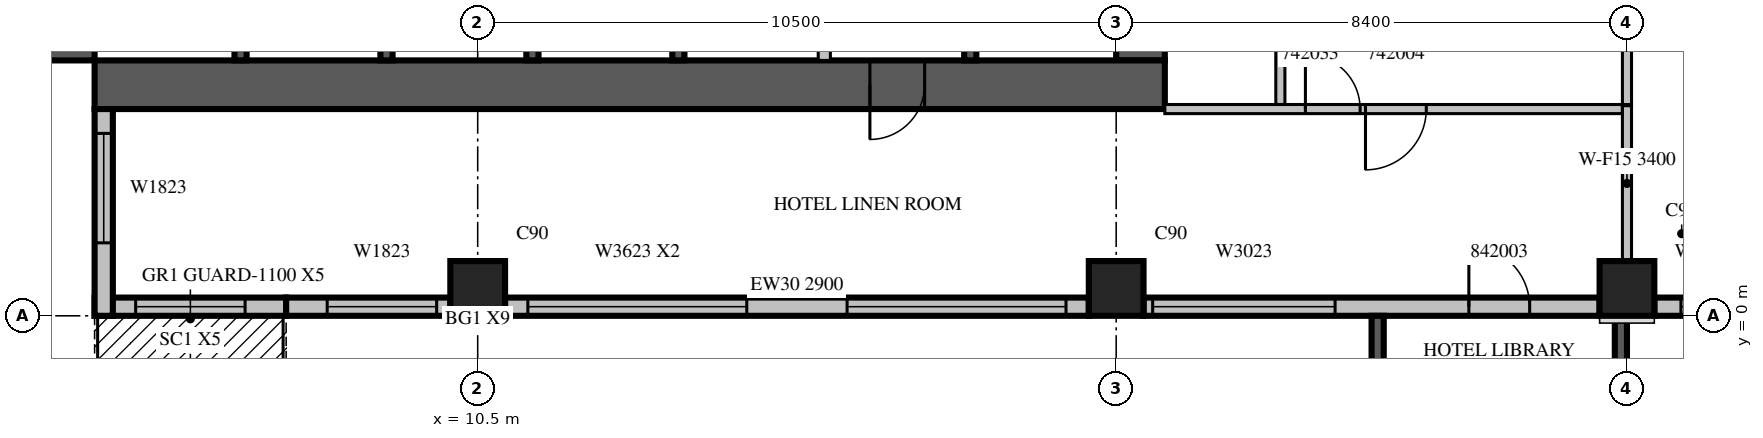
"""IFC4 building model, lengths in metres.
Left out: names, types, materials, properties, quantities, classifications, styles, units other than length and angle.
Written with IfcOpenShell. Run it as: python <this file> out.ifc"""

import sys

from ifc_helpers import new_model, si_unit, direction, frame, frame_2d, origin, origin_2d, place, context, subcontext, project, spatial, rectangle, extrude, source, transform, mapped, element, fill, save


model = new_model("IFC4")
c1 = context("Model", 3, precision=1e-05, world=origin(), true_north=direction((0.0, 1.0)))
c2 = subcontext(c1, "Body", "Model", "MODEL_VIEW")
j1 = project(units=[si_unit("LENGTHUNIT", "METRE"), si_unit("PLANEANGLEUNIT", "RADIAN")], contexts=[c1])
p1 = place(None, origin())
s1 = spatial("IfcSite", under=j1, at=p1, CompositionType="ELEMENT")
p2 = place(p1, origin())
s2 = spatial("IfcBuilding", under=s1, at=p2, CompositionType="ELEMENT")
p3 = place(p2, frame((0.0, 0.0, 193.0)))
s3 = spatial("IfcBuildingStorey", under=s2, at=p3, CompositionType="ELEMENT", Elevation=193.0)
m1 = source(origin(), c2, "Body", "SweptSolid", [
    extrude(rectangle(XDim=0.9, YDim=0.9, at=origin_2d()), origin(), (0.0, 0.0, 1.0), 3.8),
])
for number, where, z_axis, x_axis in (
    (1, (10.5, 0.45, 0.0), (0.0, 0.0, 1.0), (1.0, 0.0, 0.0)),
    (2, (21.0, 0.45, 0.0), (0.0, 0.0, 1.0), (1.0, 0.0, 0.0)),
    (3, (29.4, 0.45, 0.0), (0.0, 0.0, 1.0), (1.0, 0.0, 0.0)),
):
    element("IfcColumn", number, at=place(p3, frame(where, z_axis=z_axis, x_axis=x_axis)), inside=s3, PredefinedType="COLUMN", context=c2, shape_type="MappedRepresentation", body=[
        mapped(m1, transform((0.0, 0.0, 0.0), scale=1.0)),
    ])
m2 = source(origin(), c2, "Body", "SweptSolid", [
    extrude(rectangle(XDim=17.6, YDim=0.8, at=frame_2d((8.8, 0.0))), origin(), (0.0, 0.0, 1.0), 3.8),
])
p4 = place(p3, frame((3.8, 4.2, 0.0), z_axis=(0.0, 0.0, 1.0), x_axis=(0.0, 1.0, 0.0)))
e4 = element("IfcWall", 4, at=p4, inside=s3, PredefinedType="SHEAR", context=c2, shape_type="MappedRepresentation", body=[
    mapped(m2, transform((0.0, 0.0, 0.0), scale=1.0)),
])
m3 = source(origin(), c2, "Body", "SweptSolid", [
    extrude(rectangle(XDim=2.2, YDim=2.1, at=frame_2d((1.1, 1.05))), frame((0.0, 0.41, 0.0), z_axis=(0.0, -1.0, 0.0), x_axis=(1.0, 0.0, 0.0)), (0.0, 0.0, 1.0), 0.82),
])
p5 = place(p4, frame((4.2, 0.0, 0.0)))
e5 = element("IfcOpeningElement", 5, at=p5, cuts=e4, PredefinedType="OPENING", context=c2, shape_type="MappedRepresentation", body=[
    mapped(m3, transform((0.0, 0.0, 0.0), scale=1.0)),
])
m4 = source(origin(), c2, "Body", "SweptSolid", [
    extrude(rectangle(XDim=0.9, YDim=2.1, at=frame_2d((0.45, 1.05))), frame((0.0, 0.41, 0.0), z_axis=(0.0, -1.0, 0.0), x_axis=(1.0, 0.0, 0.0)), (0.0, 0.0, 1.0), 0.82),
])
p6 = place(p4, frame((10.95, 0.0, 0.0)))
e6 = element("IfcOpeningElement", 6, at=p6, cuts=e4, PredefinedType="OPENING", context=c2, shape_type="MappedRepresentation", body=[
    mapped(m4, transform((0.0, 0.0, 0.0), scale=1.0)),
])
m5 = source(origin(), c2, "Body", "SweptSolid", [
    extrude(rectangle(XDim=16.8, YDim=0.8, at=frame_2d((8.4, 0.0))), origin(), (0.0, 0.0, 1.0), 3.8),
])
p7 = place(p3, frame((21.4, 4.2, 0.0), z_axis=(0.0, 0.0, 1.0), x_axis=(0.0, 1.0, 0.0)))
e7 = element("IfcWall", 7, at=p7, inside=s3, PredefinedType="SHEAR", context=c2, shape_type="MappedRepresentation", body=[
    mapped(m5, transform((0.0, 0.0, 0.0), scale=1.0)),
])
p8 = place(p7, frame((4.2, 0.0, 0.0)))
e8 = element("IfcOpeningElement", 8, at=p8, cuts=e7, PredefinedType="OPENING", context=c2, shape_type="MappedRepresentation", body=[
    mapped(m3, transform((0.0, 0.0, 0.0), scale=1.0)),
])
m6 = source(origin(), c2, "Body", "SweptSolid", [
    extrude(rectangle(XDim=1.2, YDim=2.1, at=frame_2d((0.6, 1.05))), frame((0.0, 0.41, 0.0), z_axis=(0.0, -1.0, 0.0), x_axis=(1.0, 0.0, 0.0)), (0.0, 0.0, 1.0), 0.82),
])
p9 = place(p7, frame((14.7, 0.0, 0.0)))
e9 = element("IfcOpeningElement", 9, at=p9, cuts=e7, PredefinedType="OPENING", context=c2, shape_type="MappedRepresentation", body=[
    mapped(m6, transform((0.0, 0.0, 0.0), scale=1.0)),
])
p10 = place(p3, frame((4.2, 3.8, 0.0), z_axis=(0.0, 0.0, 1.0), x_axis=(1.0, 0.0, 0.0)))
e10 = element("IfcWall", 10, at=p10, inside=s3, PredefinedType="SHEAR", context=c2, shape_type="MappedRepresentation", body=[
    mapped(m2, transform((0.0, 0.0, 0.0), scale=1.0)),
])
p11 = place(p10, frame((12.75, 0.0, 0.0)))
e11 = element("IfcOpeningElement", 11, at=p11, cuts=e10, PredefinedType="OPENING", context=c2, shape_type="MappedRepresentation", body=[
    mapped(m4, transform((0.0, 0.0, 0.0), scale=1.0)),
])
m7 = source(origin(), c2, "Body", "SweptSolid", [
    extrude(rectangle(XDim=3.15, YDim=0.3, at=frame_2d((1.575, 0.0))), origin(), (0.0, 0.0, 1.0), 3.4),
])
p12 = place(p3, frame((4.2, 0.15, 0.0), z_axis=(0.0, 0.0, 1.0), x_axis=(1.0, 0.0, 0.0)))
e12 = element("IfcWall", 12, at=p12, inside=s3, PredefinedType="STANDARD", context=c2, shape_type="MappedRepresentation", body=[
    mapped(m7, transform((0.0, 0.0, 0.0), scale=1.0)),
])
m8 = source(origin(), c2, "Body", "SweptSolid", [
    extrude(rectangle(XDim=1.8, YDim=2.4, at=frame_2d((0.9, 1.2))), frame((0.0, 0.16, 0.0), z_axis=(0.0, -1.0, 0.0), x_axis=(1.0, 0.0, 0.0)), (0.0, 0.0, 1.0), 0.32),
])
p13 = place(p12, frame((0.675, 0.0, 0.0)))
e13 = element("IfcOpeningElement", 13, at=p13, cuts=e12, PredefinedType="OPENING", context=c2, shape_type="MappedRepresentation", body=[
    mapped(m8, transform((0.0, 0.0, 0.0), scale=1.0)),
])
m9 = source(origin(), c2, "Body", "SweptSolid", [
    extrude(rectangle(XDim=2.7, YDim=0.3, at=frame_2d((1.35, 0.0))), origin(), (0.0, 0.0, 1.0), 3.4),
])
p14 = place(p3, frame((7.35, 0.15, 0.0), z_axis=(0.0, 0.0, 1.0), x_axis=(1.0, 0.0, 0.0)))
e14 = element("IfcWall", 14, at=p14, inside=s3, PredefinedType="STANDARD", context=c2, shape_type="MappedRepresentation", body=[
    mapped(m9, transform((0.0, 0.0, 0.0), scale=1.0)),
])
m10 = source(origin(), c2, "Body", "SweptSolid", [
    extrude(rectangle(XDim=1.8, YDim=2.3, at=frame_2d((0.9, 1.15))), frame((0.0, 0.16, 0.0), z_axis=(0.0, -1.0, 0.0), x_axis=(1.0, 0.0, 0.0)), (0.0, 0.0, 1.0), 0.32),
])
p15 = place(p14, frame((0.675, 0.0, 0.6)))
e15 = element("IfcOpeningElement", 15, at=p15, cuts=e14, PredefinedType="OPENING", context=c2, shape_type="MappedRepresentation", body=[
    mapped(m10, transform((0.0, 0.0, 0.0), scale=1.0)),
])
m11 = source(origin(), c2, "Body", "SweptSolid", [
    extrude(rectangle(XDim=9.6, YDim=0.3, at=frame_2d((4.8, 0.0))), origin(), (0.0, 0.0, 1.0), 2.9),
])
p16 = place(p3, frame((10.95, 0.15, 0.0), z_axis=(0.0, 0.0, 1.0), x_axis=(1.0, 0.0, 0.0)))
e16 = element("IfcWall", 16, at=p16, inside=s3, PredefinedType="STANDARD", context=c2, shape_type="MappedRepresentation", body=[
    mapped(m11, transform((0.0, 0.0, 0.0), scale=1.0)),
])
m12 = source(origin(), c2, "Body", "SweptSolid", [
    extrude(rectangle(XDim=3.6, YDim=2.3, at=frame_2d((1.8, 1.15))), frame((0.0, 0.16, 0.0), z_axis=(0.0, -1.0, 0.0), x_axis=(1.0, 0.0, 0.0)), (0.0, 0.0, 1.0), 0.32),
])
p17 = place(p16, frame((0.375, 0.0, 0.6)))
e17 = element("IfcOpeningElement", 17, at=p17, cuts=e16, PredefinedType="OPENING", context=c2, shape_type="MappedRepresentation", body=[
    mapped(m12, transform((0.0, 0.0, 0.0), scale=1.0)),
])
p18 = place(p16, frame((5.625, 0.0, 0.6)))
e18 = element("IfcOpeningElement", 18, at=p18, cuts=e16, PredefinedType="OPENING", context=c2, shape_type="MappedRepresentation", body=[
    mapped(m12, transform((0.0, 0.0, 0.0), scale=1.0)),
])
m13 = source(origin(), c2, "Body", "SweptSolid", [
    extrude(rectangle(XDim=7.5, YDim=0.3, at=frame_2d((3.75, 0.0))), origin(), (0.0, 0.0, 1.0), 3.4),
])
p19 = place(p3, frame((21.45, 0.15, 0.0), z_axis=(0.0, 0.0, 1.0), x_axis=(1.0, 0.0, 0.0)))
e19 = element("IfcWall", 19, at=p19, inside=s3, PredefinedType="STANDARD", context=c2, shape_type="MappedRepresentation", body=[
    mapped(m13, transform((0.0, 0.0, 0.0), scale=1.0)),
])
m14 = source(origin(), c2, "Body", "SweptSolid", [
    extrude(rectangle(XDim=3.0, YDim=2.3, at=frame_2d((1.5, 1.15))), frame((0.0, 0.16, 0.0), z_axis=(0.0, -1.0, 0.0), x_axis=(1.0, 0.0, 0.0)), (0.0, 0.0, 1.0), 0.32),
])
p20 = place(p19, frame((0.15, 0.0, 0.6)))
e20 = element("IfcOpeningElement", 20, at=p20, cuts=e19, PredefinedType="OPENING", context=c2, shape_type="MappedRepresentation", body=[
    mapped(m14, transform((0.0, 0.0, 0.0), scale=1.0)),
])
m15 = source(origin(), c2, "Body", "SweptSolid", [
    extrude(rectangle(XDim=1.0, YDim=2.1, at=frame_2d((0.5, 1.05))), frame((0.0, 0.16, 0.0), z_axis=(0.0, -1.0, 0.0), x_axis=(1.0, 0.0, 0.0)), (0.0, 0.0, 1.0), 0.32),
])
p21 = place(p19, frame((5.35, 0.0, 0.0)))
e21 = element("IfcOpeningElement", 21, at=p21, cuts=e19, PredefinedType="OPENING", context=c2, shape_type="MappedRepresentation", body=[
    mapped(m15, transform((0.0, 0.0, 0.0), scale=1.0)),
])
p22 = place(p3, frame((29.85, 0.15, 0.0), z_axis=(0.0, 0.0, 1.0), x_axis=(1.0, 0.0, 0.0)))
e22 = element("IfcWall", 22, at=p22, inside=s3, PredefinedType="STANDARD", context=c2, shape_type="MappedRepresentation", body=[
    mapped(m13, transform((0.0, 0.0, 0.0), scale=1.0)),
])
m16 = source(origin(), c2, "Body", "SweptSolid", [
    extrude(rectangle(XDim=1.2, YDim=2.3, at=frame_2d((0.6, 1.15))), frame((0.0, 0.16, 0.0), z_axis=(0.0, -1.0, 0.0), x_axis=(1.0, 0.0, 0.0)), (0.0, 0.0, 1.0), 0.32),
])
p23 = place(p22, frame((0.438, 0.0, 0.6)))
e23 = element("IfcOpeningElement", 23, at=p23, cuts=e22, PredefinedType="OPENING", context=c2, shape_type="MappedRepresentation", body=[
    mapped(m16, transform((0.0, 0.0, 0.0), scale=1.0)),
])
p24 = place(p22, frame((5.963, 0.0, 0.6)))
e24 = element("IfcOpeningElement", 24, at=p24, cuts=e22, PredefinedType="OPENING", context=c2, shape_type="MappedRepresentation", body=[
    mapped(m16, transform((0.0, 0.0, 0.0), scale=1.0)),
])
m17 = source(origin(), c2, "Body", "SweptSolid", [
    extrude(rectangle(XDim=2.4, YDim=2.3, at=frame_2d((1.2, 1.15))), frame((0.0, 0.16, 0.0), z_axis=(0.0, -1.0, 0.0), x_axis=(1.0, 0.0, 0.0)), (0.0, 0.0, 1.0), 0.32),
])
p25 = place(p22, frame((2.6, 0.0, 0.6)))
e25 = element("IfcOpeningElement", 25, at=p25, cuts=e22, PredefinedType="OPENING", context=c2, shape_type="MappedRepresentation", body=[
    mapped(m17, transform((0.0, 0.0, 0.0), scale=1.0)),
])
m18 = source(origin(), c2, "Body", "SweptSolid", [
    extrude(rectangle(XDim=3.4, YDim=0.3, at=frame_2d((1.7, 0.0))), origin(), (0.0, 0.0, 1.0), 3.4),
])
p26 = place(p3, frame((4.35, 3.4, 0.0), z_axis=(0.0, 0.0, 1.0), x_axis=(0.0, -1.0, 0.0)))
e26 = element("IfcWall", 26, at=p26, inside=s3, PredefinedType="STANDARD", context=c2, shape_type="MappedRepresentation", body=[
    mapped(m18, transform((0.0, 0.0, 0.0), scale=1.0)),
])
p27 = place(p26, frame((0.4, 0.0, 0.6)))
e27 = element("IfcOpeningElement", 27, at=p27, cuts=e26, PredefinedType="OPENING", context=c2, shape_type="MappedRepresentation", body=[
    mapped(m10, transform((0.0, 0.0, 0.0), scale=1.0)),
])
m19 = source(origin(), c2, "Body", "SweptSolid", [
    extrude(rectangle(XDim=3.9, YDim=0.2, at=frame_2d((1.95, 0.0))), origin(), (0.0, 0.0, 1.0), 3.39),
])
p28 = place(p3, frame((25.3, 0.0, 0.0), z_axis=(0.0, 0.0, 1.0), x_axis=(0.0, -1.0, 0.0)))
e28 = element("IfcWall", 28, at=p28, inside=s3, PredefinedType="SOLIDWALL", context=c2, shape_type="MappedRepresentation", body=[
    mapped(m19, transform((0.0, 0.0, 0.0), scale=1.0)),
])
m20 = source(origin(), c2, "Body", "SweptSolid", [
    extrude(rectangle(XDim=2.4, YDim=2.3, at=frame_2d((1.2, 1.15))), frame((0.0, 0.11, 0.0), z_axis=(0.0, -1.0, 0.0), x_axis=(1.0, 0.0, 0.0)), (0.0, 0.0, 1.0), 0.22),
])
p29 = place(p28, frame((0.75, 0.0, 0.6)))
e29 = element("IfcOpeningElement", 29, at=p29, cuts=e28, PredefinedType="OPENING", context=c2, shape_type="MappedRepresentation", body=[
    mapped(m20, transform((0.0, 0.0, 0.0), scale=1.0)),
])
p30 = place(p3, frame((29.3, 0.0, 0.0), z_axis=(0.0, 0.0, 1.0), x_axis=(0.0, -1.0, 0.0)))
e30 = element("IfcWall", 30, at=p30, inside=s3, PredefinedType="SOLIDWALL", context=c2, shape_type="MappedRepresentation", body=[
    mapped(m19, transform((0.0, 0.0, 0.0), scale=1.0)),
])
p31 = place(p30, frame((0.75, 0.0, 0.6)))
e31 = element("IfcOpeningElement", 31, at=p31, cuts=e30, PredefinedType="OPENING", context=c2, shape_type="MappedRepresentation", body=[
    mapped(m20, transform((0.0, 0.0, 0.0), scale=1.0)),
])
m21 = source(origin(), c2, "Body", "SweptSolid", [
    extrude(rectangle(XDim=3.1, YDim=0.2, at=frame_2d((1.55, 0.0))), origin(), (0.0, 0.0, 1.0), 3.8),
])
for number, where, z_axis, x_axis in (
    (32, (6.6, 4.2, 0.0), (0.0, 0.0, 1.0), (0.0, 1.0, 0.0)),
    (33, (9.0, 4.2, 0.0), (0.0, 0.0, 1.0), (0.0, 1.0, 0.0)),
    (34, (11.4, 4.2, 0.0), (0.0, 0.0, 1.0), (0.0, 1.0, 0.0)),
):
    element("IfcWall", number, at=place(p3, frame(where, z_axis=z_axis, x_axis=x_axis)), inside=s3, PredefinedType="SOLIDWALL", context=c2, shape_type="MappedRepresentation", body=[
        mapped(m21, transform((0.0, 0.0, 0.0), scale=1.0)),
    ])
m22 = source(origin(), c2, "Body", "SweptSolid", [
    extrude(rectangle(XDim=3.1, YDim=0.2, at=frame_2d((1.55, 0.0))), origin(), (0.0, 0.0, 1.0), 3.4),
])
for number, where, z_axis, x_axis in (
    (35, (13.8, 4.2, 0.0), (0.0, 0.0, 1.0), (0.0, 1.0, 0.0)),
    (36, (18.6, 4.2, 0.0), (0.0, 0.0, 1.0), (0.0, 1.0, 0.0)),
):
    element("IfcWall", number, at=place(p3, frame(where, z_axis=z_axis, x_axis=x_axis)), inside=s3, PredefinedType="SOLIDWALL", context=c2, shape_type="MappedRepresentation", body=[
        mapped(m22, transform((0.0, 0.0, 0.0), scale=1.0)),
    ])
p32 = place(p3, frame((16.2, 4.2, 0.0), z_axis=(0.0, 0.0, 1.0), x_axis=(0.0, 1.0, 0.0)))
e37 = element("IfcWall", 37, at=p32, inside=s3, PredefinedType="PARTITIONING", context=c2, shape_type="SweptSolid", body=[
    extrude(rectangle(XDim=3.1, YDim=0.2, at=frame_2d((1.55, 0.0))), origin(), (0.0, 0.0, 1.0), 3.4),
])
p33 = place(p3, frame((23.7, 14.7, 0.0), z_axis=(0.0, 0.0, 1.0), x_axis=(0.0, -1.0, 0.0)))
e38 = element("IfcWall", 38, at=p33, inside=s3, PredefinedType="PARTITIONING", context=c2, shape_type="SweptSolid", body=[
    extrude(rectangle(XDim=11.225, YDim=0.15, at=frame_2d((5.612, 0.0))), origin(), (0.0, 0.0, 1.0), 2.4),
])
m23 = source(origin(), c2, "Body", "SweptSolid", [
    extrude(rectangle(XDim=0.9, YDim=2.1, at=frame_2d((0.45, 1.05))), frame((0.0, 0.085, 0.0), z_axis=(0.0, -1.0, 0.0), x_axis=(1.0, 0.0, 0.0)), (0.0, 0.0, 1.0), 0.17),
])
p34 = place(p33, frame((8.463, 0.0, 0.0)))
e39 = element("IfcOpeningElement", 39, at=p34, cuts=e38, PredefinedType="OPENING", context=c2, shape_type="MappedRepresentation", body=[
    mapped(m23, transform((0.0, 0.0, 0.0), scale=1.0)),
])
p35 = place(p33, frame((1.975, 0.0, 0.0)))
e40 = element("IfcOpeningElement", 40, at=p35, cuts=e38, PredefinedType="OPENING", context=c2, shape_type="MappedRepresentation", body=[
    mapped(m23, transform((0.0, 0.0, 0.0), scale=1.0)),
])
m24 = source(origin(), c2, "Body", "SweptSolid", [
    extrude(rectangle(XDim=6.576, YDim=0.15, at=frame_2d((3.288, 0.0))), origin(), (0.0, 0.0, 1.0), 3.4),
])
p36 = place(p3, frame((29.4, 3.475, 0.0), z_axis=(0.0, 0.0, 1.0), x_axis=(0.0, 1.0, 0.0)))
e41 = element("IfcWall", 41, at=p36, inside=s3, PredefinedType="PARTITIONING", context=c2, shape_type="MappedRepresentation", body=[
    mapped(m24, transform((0.0, 0.0, 0.0), scale=1.0)),
])
m25 = source(origin(), c2, "Body", "SweptSolid", [
    extrude(rectangle(XDim=7.525, YDim=0.15, at=frame_2d((3.763, 0.0))), origin(), (0.0, 0.0, 1.0), 3.4),
])
p37 = place(p3, frame((21.8, 3.4, 0.0), z_axis=(0.0, 0.0, 1.0), x_axis=(1.0, 0.0, 0.0)))
e42 = element("IfcWall", 42, at=p37, inside=s3, PredefinedType="PARTITIONING", context=c2, shape_type="MappedRepresentation", body=[
    mapped(m25, transform((0.0, 0.0, 0.0), scale=1.0)),
])
m26 = source(origin(), c2, "Body", "SweptSolid", [
    extrude(rectangle(XDim=1.0, YDim=2.1, at=frame_2d((0.5, 1.05))), frame((0.0, 0.085, 0.0), z_axis=(0.0, -1.0, 0.0), x_axis=(1.0, 0.0, 0.0)), (0.0, 0.0, 1.0), 0.17),
])
p38 = place(p37, frame((3.3, 0.0, 0.0)))
e43 = element("IfcOpeningElement", 43, at=p38, cuts=e42, PredefinedType="OPENING", context=c2, shape_type="MappedRepresentation", body=[
    mapped(m26, transform((0.0, 0.0, 0.0), scale=1.0)),
])
p39 = place(p37, frame((2.312, 0.0, 0.0)))
e44 = element("IfcOpeningElement", 44, at=p39, cuts=e42, PredefinedType="OPENING", context=c2, shape_type="MappedRepresentation", body=[
    mapped(m23, transform((0.0, 0.0, 0.0), scale=1.0)),
])
m27 = source(origin(), c2, "Body", "SweptSolid", [
    extrude(rectangle(XDim=2.556, YDim=0.15, at=frame_2d((1.278, 0.0))), origin(), (0.0, 0.0, 1.0), 3.4),
])
p40 = place(p3, frame((29.4, 0.899, 0.0), z_axis=(0.0, 0.0, 1.0), x_axis=(0.0, 1.0, 0.0)))
e45 = element("IfcWall", 45, at=p40, inside=s3, PredefinedType="PARTITIONING", context=c2, shape_type="MappedRepresentation", body=[
    mapped(m27, transform((0.0, 0.0, 0.0), scale=1.0)),
])
m28 = source(origin(), c2, "Body", "SweptSolid", [
    extrude(rectangle(XDim=1.8, YDim=2.4, at=frame_2d((0.9, 1.2))), frame((0.0, 0.025, 0.0), z_axis=(0.0, -1.0, 0.0), x_axis=(1.0, 0.0, 0.0)), (0.0, 0.0, 1.0), 0.05),
])
p41 = place(p13, origin())
e46 = element("IfcDoor", 46, at=p41, inside=s3, OperationType="SLIDING_TO_LEFT", PredefinedType="DOOR", context=c2, shape_type="MappedRepresentation", body=[
    mapped(m28, transform((0.0, 0.0, 0.0), scale=1.0)),
])
fill(e13, e46)
m29 = source(origin(), c2, "Body", "SweptSolid", [
    extrude(rectangle(XDim=1.8, YDim=2.3, at=frame_2d((0.9, 1.15))), frame((0.0, 0.03, 0.0), z_axis=(0.0, -1.0, 0.0), x_axis=(1.0, 0.0, 0.0)), (0.0, 0.0, 1.0), 0.06),
])
p42 = place(p15, origin())
e47 = element("IfcWindow", 47, at=p42, inside=s3, PartitioningType="SINGLE_PANEL", PredefinedType="WINDOW", context=c2, shape_type="MappedRepresentation", body=[
    mapped(m29, transform((0.0, 0.0, 0.0), scale=1.0)),
])
fill(e15, e47)
m30 = source(origin(), c2, "Body", "SweptSolid", [
    extrude(rectangle(XDim=3.6, YDim=2.3, at=frame_2d((1.8, 1.15))), frame((0.0, 0.03, 0.0), z_axis=(0.0, -1.0, 0.0), x_axis=(1.0, 0.0, 0.0)), (0.0, 0.0, 1.0), 0.06),
])
p43 = place(p17, origin())
e48 = element("IfcWindow", 48, at=p43, inside=s3, PartitioningType="SINGLE_PANEL", PredefinedType="WINDOW", context=c2, shape_type="MappedRepresentation", body=[
    mapped(m30, transform((0.0, 0.0, 0.0), scale=1.0)),
])
fill(e17, e48)
p44 = place(p18, origin())
e49 = element("IfcWindow", 49, at=p44, inside=s3, PartitioningType="SINGLE_PANEL", PredefinedType="WINDOW", context=c2, shape_type="MappedRepresentation", body=[
    mapped(m30, transform((0.0, 0.0, 0.0), scale=1.0)),
])
fill(e18, e49)
m31 = source(origin(), c2, "Body", "SweptSolid", [
    extrude(rectangle(XDim=3.0, YDim=2.3, at=frame_2d((1.5, 1.15))), frame((0.0, 0.03, 0.0), z_axis=(0.0, -1.0, 0.0), x_axis=(1.0, 0.0, 0.0)), (0.0, 0.0, 1.0), 0.06),
])
p45 = place(p20, origin())
e50 = element("IfcWindow", 50, at=p45, inside=s3, PartitioningType="SINGLE_PANEL", PredefinedType="WINDOW", context=c2, shape_type="MappedRepresentation", body=[
    mapped(m31, transform((0.0, 0.0, 0.0), scale=1.0)),
])
fill(e20, e50)
m32 = source(origin(), c2, "Body", "SweptSolid", [
    extrude(rectangle(XDim=1.2, YDim=2.3, at=frame_2d((0.6, 1.15))), frame((0.0, 0.03, 0.0), z_axis=(0.0, -1.0, 0.0), x_axis=(1.0, 0.0, 0.0)), (0.0, 0.0, 1.0), 0.06),
])
p46 = place(p23, origin())
e51 = element("IfcWindow", 51, at=p46, inside=s3, PartitioningType="SINGLE_PANEL", PredefinedType="WINDOW", context=c2, shape_type="MappedRepresentation", body=[
    mapped(m32, transform((0.0, 0.0, 0.0), scale=1.0)),
])
fill(e23, e51)
p47 = place(p27, origin())
e52 = element("IfcWindow", 52, at=p47, inside=s3, PartitioningType="SINGLE_PANEL", PredefinedType="WINDOW", context=c2, shape_type="MappedRepresentation", body=[
    mapped(m29, transform((0.0, 0.0, 0.0), scale=1.0)),
])
fill(e27, e52)
m33 = source(origin(), c2, "Body", "SweptSolid", [
    extrude(rectangle(XDim=0.9, YDim=2.1, at=frame_2d((0.45, 1.05))), frame((0.0, 0.025, 0.0), z_axis=(0.0, -1.0, 0.0), x_axis=(1.0, 0.0, 0.0)), (0.0, 0.0, 1.0), 0.05),
])
p48 = place(p11, origin())
e53 = element("IfcDoor", 53, at=p48, inside=s3, OperationType="SINGLE_SWING_RIGHT", PredefinedType="DOOR", context=c2, shape_type="MappedRepresentation", body=[
    mapped(m33, transform((0.0, 0.0, 0.0), scale=1.0)),
])
fill(e11, e53)
m34 = source(origin(), c2, "Body", "SweptSolid", [
    extrude(rectangle(XDim=1.0, YDim=2.1, at=frame_2d((0.5, 1.05))), frame((0.0, 0.025, 0.0), z_axis=(0.0, -1.0, 0.0), x_axis=(1.0, 0.0, 0.0)), (0.0, 0.0, 1.0), 0.05),
])
p49 = place(p38, origin())
e54 = element("IfcDoor", 54, at=p49, inside=s3, OperationType="SINGLE_SWING_RIGHT", PredefinedType="DOOR", context=c2, shape_type="MappedRepresentation", body=[
    mapped(m34, transform((0.0, 0.0, 0.0), scale=1.0)),
])
fill(e43, e54)
p50 = place(p39, origin())
e55 = element("IfcDoor", 55, at=p50, inside=s3, OperationType="SINGLE_SWING_LEFT", PredefinedType="DOOR", context=c2, shape_type="MappedRepresentation", body=[
    mapped(m33, transform((0.0, 0.0, 0.0), scale=1.0)),
])
fill(e44, e55)
p51 = place(p21, origin())
e56 = element("IfcDoor", 56, at=p51, inside=s3, OperationType="SINGLE_SWING_LEFT", PredefinedType="DOOR", context=c2, shape_type="MappedRepresentation", body=[
    mapped(m34, transform((0.0, 0.0, 0.0), scale=1.0)),
])
fill(e21, e56)
save(model, sys.argv[1])
